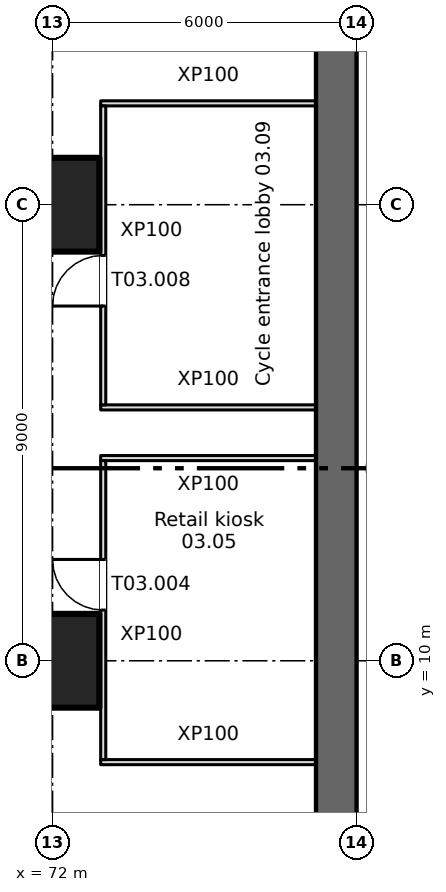
"""IFC4 building model, lengths in metres.
Left out: names, types, materials, properties, quantities, classifications, styles, units other than length and angle.
Written with IfcOpenShell. Run it as: python <this file> out.ifc"""

import sys

from ifc_helpers import new_model, si_unit, direction, frame, frame_2d, origin, origin_2d, place, context, subcontext, project, spatial, rectangle, extrude, element, fill, save


model = new_model("IFC4")
c1 = context("Model", 3, precision=1e-05, world=origin(), true_north=direction((0.0, 1.0)))
c2 = subcontext(c1, "Body", "Model", "MODEL_VIEW")
j1 = project(units=[si_unit("LENGTHUNIT", "METRE"), si_unit("PLANEANGLEUNIT", "RADIAN")], contexts=[c1])
p1 = place(None, origin())
s1 = spatial("IfcSite", under=j1, at=p1, CompositionType="ELEMENT")
p2 = place(p1, origin())
s2 = spatial("IfcBuilding", under=s1, at=p2, CompositionType="ELEMENT")
p3 = place(p2, origin())
s3 = spatial("IfcBuildingStorey", under=s2, at=p3, CompositionType="ELEMENT", Elevation=0.0)
for number, where, z_axis, x_axis in (
    (1, (72.0, 10.0, 0.0), (0.0, 0.0, 1.0), (1.0, 0.0, 0.0)),
    (2, (72.0, 19.0, 0.0), (0.0, 0.0, 1.0), (1.0, 0.0, 0.0)),
):
    element("IfcColumn", number, at=place(p3, frame(where, z_axis=z_axis, x_axis=x_axis)), inside=s3, PredefinedType="COLUMN", context=c2, shape_type="SweptSolid", body=[
        extrude(rectangle(XDim=1.85, YDim=1.85, at=origin_2d()), origin(), (0.0, 0.0, 1.0), 6.0),
    ])
p4 = place(p3, frame((77.6, 4.5, 0.0), z_axis=(0.0, 0.0, 1.0), x_axis=(0.0, 1.0, 0.0)))
e3 = element("IfcWall", 3, at=p4, inside=s3, PredefinedType="SHEAR", context=c2, shape_type="SweptSolid", body=[
    extrude(rectangle(XDim=37.0, YDim=0.8, at=frame_2d((18.5, 0.0))), origin(), (0.0, 0.0, 1.0), 6.0),
])
for number, where, z_axis, x_axis in (
    (4, (72.95, 8.0, 0.0), (0.0, 0.0, 1.0), (1.0, 0.0, 0.0)),
    (5, (72.95, 14.0, 0.0), (0.0, 0.0, 1.0), (1.0, 0.0, 0.0)),
    (6, (72.95, 15.0, 0.0), (0.0, 0.0, 1.0), (1.0, 0.0, 0.0)),
    (7, (72.95, 21.0, 0.0), (0.0, 0.0, 1.0), (1.0, 0.0, 0.0)),
):
    element("IfcWall", number, at=place(p3, frame(where, z_axis=z_axis, x_axis=x_axis)), inside=s3, PredefinedType="PARTITIONING", context=c2, shape_type="SweptSolid", body=[
        extrude(rectangle(XDim=4.25, YDim=0.1, at=frame_2d((2.125, 0.0))), origin(), (0.0, 0.0, 1.0), 6.0),
    ])
p5 = place(p3, frame((73.0, 8.05, 0.0), z_axis=(0.0, 0.0, 1.0), x_axis=(0.0, 1.0, 0.0)))
e8 = element("IfcWall", 8, at=p5, inside=s3, PredefinedType="PARTITIONING", context=c2, shape_type="SweptSolid", body=[
    extrude(rectangle(XDim=5.9, YDim=0.1, at=frame_2d((2.95, 0.0))), origin(), (0.0, 0.0, 1.0), 6.0),
])
p6 = place(p5, frame((2.95, 0.0, 0.0)))
e9 = element("IfcOpeningElement", 9, at=p6, cuts=e8, PredefinedType="OPENING", context=c2, shape_type="SweptSolid", body=[
    extrude(rectangle(XDim=1.0, YDim=2.1, at=frame_2d((0.5, 1.05))), frame((0.0, 0.06, 0.0), z_axis=(0.0, -1.0, 0.0), x_axis=(1.0, 0.0, 0.0)), (0.0, 0.0, 1.0), 0.12),
])
p7 = place(p3, frame((73.0, 15.05, 0.0), z_axis=(0.0, 0.0, 1.0), x_axis=(0.0, 1.0, 0.0)))
e10 = element("IfcWall", 10, at=p7, inside=s3, PredefinedType="PARTITIONING", context=c2, shape_type="SweptSolid", body=[
    extrude(rectangle(XDim=5.9, YDim=0.1, at=frame_2d((2.95, 0.0))), origin(), (0.0, 0.0, 1.0), 6.0),
])
p8 = place(p7, frame((1.95, 0.0, 0.0)))
e11 = element("IfcOpeningElement", 11, at=p8, cuts=e10, PredefinedType="OPENING", context=c2, shape_type="SweptSolid", body=[
    extrude(rectangle(XDim=1.0, YDim=2.1, at=frame_2d((0.5, 1.05))), frame((0.0, 0.06, 0.0), z_axis=(0.0, -1.0, 0.0), x_axis=(1.0, 0.0, 0.0)), (0.0, 0.0, 1.0), 0.12),
])
p9 = place(p6, origin())
e12 = element("IfcDoor", 12, at=p9, inside=s3, OperationType="SINGLE_SWING_RIGHT", PredefinedType="DOOR", context=c2, shape_type="SweptSolid", body=[
    extrude(rectangle(XDim=1.0, YDim=2.1, at=frame_2d((0.5, 1.05))), frame((0.0, 0.025, 0.0), z_axis=(0.0, -1.0, 0.0), x_axis=(1.0, 0.0, 0.0)), (0.0, 0.0, 1.0), 0.05),
])
fill(e9, e12)
p10 = place(p8, origin())
e13 = element("IfcDoor", 13, at=p10, inside=s3, OperationType="SINGLE_SWING_LEFT", PredefinedType="DOOR", context=c2, shape_type="SweptSolid", body=[
    extrude(rectangle(XDim=1.0, YDim=2.1, at=frame_2d((0.5, 1.05))), frame((0.0, 0.025, 0.0), z_axis=(0.0, -1.0, 0.0), x_axis=(1.0, 0.0, 0.0)), (0.0, 0.0, 1.0), 0.05),
])
fill(e11, e13)
save(model, sys.argv[1])
